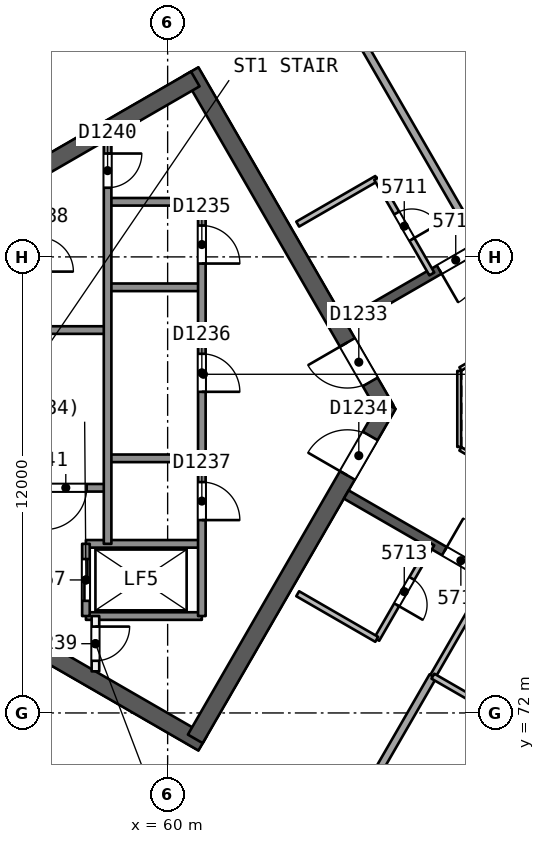
"""IFC4 building model, lengths in metres.
Left out: names, types, materials, properties, quantities, classifications, styles, units other than length and angle.
Written with IfcOpenShell. Run it as: python <this file> out.ifc"""

import sys

from ifc_helpers import new_model, si_unit, direction, frame, frame_2d, origin, place, context, subcontext, project, spatial, rectangle, extrude, element, fill, save


model = new_model("IFC4")
c1 = context("Model", 3, precision=1e-05, world=origin(), true_north=direction((0.0, 1.0)))
c2 = subcontext(c1, "Body", "Model", "MODEL_VIEW")
j1 = project(units=[si_unit("LENGTHUNIT", "METRE"), si_unit("PLANEANGLEUNIT", "RADIAN")], contexts=[c1])
p1 = place(None, origin())
s1 = spatial("IfcSite", under=j1, at=p1, CompositionType="ELEMENT")
p2 = place(p1, origin())
s2 = spatial("IfcBuilding", under=s1, at=p2, CompositionType="ELEMENT")
p3 = place(p2, frame((0.0, 0.0, 231.7)))
s3 = spatial("IfcBuildingStorey", under=s2, at=p3, CompositionType="ELEMENT", Elevation=231.7)
p4 = place(p3, frame((65.74, 80.0, 0.0), z_axis=(0.0, 0.0, 1.0), x_axis=(-0.499991857942, 0.866030104553, 0.0)))
e1 = element("IfcWall", 1, at=p4, inside=s3, PredefinedType="SHEAR", context=c2, shape_type="SweptSolid", body=[
    extrude(rectangle(XDim=10.25, YDim=0.45, at=frame_2d((5.125, 0.0))), origin(), (0.0, 0.0, 1.0), 3.7),
])
p5 = place(p4, frame((0.82, 0.0, 0.0)))
e2 = element("IfcOpeningElement", 2, at=p5, cuts=e1, PredefinedType="OPENING", context=c2, shape_type="SweptSolid", body=[
    extrude(rectangle(XDim=1.2, YDim=2.1, at=frame_2d((0.6, 1.05))), frame((0.0, 0.235, 0.0), z_axis=(0.0, -1.0, 0.0), x_axis=(1.0, 0.0, 0.0)), (0.0, 0.0, 1.0), 0.471),
])
p6 = place(p3, frame((60.728, 88.682, 0.0), z_axis=(0.0, 0.0, 1.0), x_axis=(-0.866021613849, -0.500006564303, 0.0)))
e3 = element("IfcWall", 3, at=p6, inside=s3, PredefinedType="SHEAR", context=c2, shape_type="SweptSolid", body=[
    extrude(rectangle(XDim=14.108, YDim=0.45, at=frame_2d((7.054, 0.0))), origin(), (0.0, 0.0, 1.0), 3.7),
])
p7 = place(p3, frame((48.622, 78.307, 0.0), z_axis=(0.0, 0.0, 1.0), x_axis=(0.86602701116, -0.499997215934, 0.0)))
e4 = element("IfcWall", 4, at=p7, inside=s3, PredefinedType="SHEAR", context=c2, shape_type="SweptSolid", body=[
    extrude(rectangle(XDim=14.204, YDim=0.45, at=frame_2d((7.102, 0.0))), origin(), (0.0, 0.0, 1.0), 3.7),
])
p8 = place(p3, frame((60.728, 71.318, 0.0), z_axis=(0.0, 0.0, 1.0), x_axis=(0.500012416173, 0.866018235185, 0.0)))
e5 = element("IfcWall", 5, at=p8, inside=s3, PredefinedType="SHEAR", context=c2, shape_type="SweptSolid", body=[
    extrude(rectangle(XDim=10.155, YDim=0.45, at=frame_2d((5.078, 0.0))), origin(), (0.0, 0.0, 1.0), 3.7),
])
p9 = place(p8, frame((8.005, 0.0, 0.0)))
e6 = element("IfcOpeningElement", 6, at=p9, cuts=e5, PredefinedType="OPENING", context=c2, shape_type="SweptSolid", body=[
    extrude(rectangle(XDim=1.2, YDim=2.1, at=frame_2d((0.6, 1.05))), frame((0.0, 0.235, 0.0), z_axis=(0.0, -1.0, 0.0), x_axis=(1.0, 0.0, 0.0)), (0.0, 0.0, 1.0), 0.471),
])
p10 = place(p3, frame((78.2, 90.046, 0.0), z_axis=(0.0, 0.0, 1.0), x_axis=(-0.866026492143, -0.499998114903, 0.0)))
e7 = element("IfcWall", 7, at=p10, inside=s3, PredefinedType="SHEAR", context=c2, shape_type="SweptSolid", body=[
    extrude(rectangle(XDim=15.588, YDim=0.25, at=frame_2d((7.794, 0.0))), origin(), (0.0, 0.0, 1.0), 3.3),
])
p11 = place(p10, frame((3.294, 0.0, 0.0)))
e8 = element("IfcOpeningElement", 8, at=p11, cuts=e7, PredefinedType="OPENING", context=c2, shape_type="SweptSolid", body=[
    extrude(rectangle(XDim=1.0, YDim=2.1, at=frame_2d((0.5, 1.05))), frame((0.0, 0.135, 0.0), z_axis=(0.0, -1.0, 0.0), x_axis=(1.0, 0.0, 0.0)), (0.0, 0.0, 1.0), 0.271),
])
p12 = place(p10, frame((9.162, 0.0, 0.0)))
e9 = element("IfcOpeningElement", 9, at=p12, cuts=e7, PredefinedType="OPENING", context=c2, shape_type="SweptSolid", body=[
    extrude(rectangle(XDim=1.1, YDim=2.1, at=frame_2d((0.55, 1.05))), frame((0.0, 0.135, 0.0), z_axis=(0.0, -1.0, 0.0), x_axis=(1.0, 0.0, 0.0)), (0.0, 0.0, 1.0), 0.271),
])
p13 = place(p10, frame((11.762, 0.0, 0.0)))
e10 = element("IfcOpeningElement", 10, at=p13, cuts=e7, PredefinedType="OPENING", context=c2, shape_type="SweptSolid", body=[
    extrude(rectangle(XDim=1.0, YDim=2.1, at=frame_2d((0.5, 1.05))), frame((0.0, 0.135, 0.0), z_axis=(0.0, -1.0, 0.0), x_axis=(1.0, 0.0, 0.0)), (0.0, 0.0, 1.0), 0.271),
])
p14 = place(p3, frame((64.7, 77.748, 0.0), z_axis=(0.0, 0.0, 1.0), x_axis=(0.866026492143, -0.499998114903, 0.0)))
e11 = element("IfcWall", 11, at=p14, inside=s3, PredefinedType="SHEAR", context=c2, shape_type="SweptSolid", body=[
    extrude(rectangle(XDim=15.588, YDim=0.25, at=frame_2d((7.794, 0.0))), origin(), (0.0, 0.0, 1.0), 3.3),
])
p15 = place(p14, frame((2.982, 0.0, 0.0)))
e12 = element("IfcOpeningElement", 12, at=p15, cuts=e11, PredefinedType="OPENING", context=c2, shape_type="SweptSolid", body=[
    extrude(rectangle(XDim=1.0, YDim=2.1, at=frame_2d((0.5, 1.05))), frame((0.0, 0.135, 0.0), z_axis=(0.0, -1.0, 0.0), x_axis=(1.0, 0.0, 0.0)), (0.0, 0.0, 1.0), 0.271),
])
p16 = place(p14, frame((8.538, 0.0, 0.0)))
e13 = element("IfcOpeningElement", 13, at=p16, cuts=e11, PredefinedType="OPENING", context=c2, shape_type="SweptSolid", body=[
    extrude(rectangle(XDim=1.1, YDim=2.1, at=frame_2d((0.55, 1.05))), frame((0.0, 0.135, 0.0), z_axis=(0.0, -1.0, 0.0), x_axis=(1.0, 0.0, 0.0)), (0.0, 0.0, 1.0), 0.271),
])
p17 = place(p14, frame((11.45, 0.0, 0.0)))
e14 = element("IfcOpeningElement", 14, at=p17, cuts=e11, PredefinedType="OPENING", context=c2, shape_type="SweptSolid", body=[
    extrude(rectangle(XDim=1.0, YDim=2.1, at=frame_2d((0.5, 1.05))), frame((0.0, 0.135, 0.0), z_axis=(0.0, -1.0, 0.0), x_axis=(1.0, 0.0, 0.0)), (0.0, 0.0, 1.0), 0.271),
])
p18 = place(p3, frame((63.121, 93.093, 0.0), z_axis=(0.0, 0.0, 1.0), x_axis=(0.499993053251, -0.866029414455, 0.0)))
e15 = element("IfcWall", 15, at=p18, inside=s3, PredefinedType="PARTITIONING", context=c2, shape_type="SweptSolid", body=[
    extrude(rectangle(XDim=10.179, YDim=0.2, at=frame_2d((5.089, 0.0))), origin(), (0.0, 0.0, 1.0), 3.3),
])
p19 = place(p3, frame((63.422, 84.863, 0.0), z_axis=(0.0, 0.0, 1.0), x_axis=(0.865994240961, 0.500053971709, 0.0)))
e16 = element("IfcWall", 16, at=p19, inside=s3, PredefinedType="PARTITIONING", context=c2, shape_type="SweptSolid", body=[
    extrude(rectangle(XDim=2.401, YDim=0.15, at=frame_2d((1.201, 0.0))), origin(), (0.0, 0.0, 1.0), 3.3),
])
p20 = place(p3, frame((65.502, 86.063, 0.0), z_axis=(0.0, 0.0, 1.0), x_axis=(0.499987231761, -0.866032775405, 0.0)))
e17 = element("IfcWall", 17, at=p20, inside=s3, PredefinedType="PARTITIONING", context=c2, shape_type="SweptSolid", body=[
    extrude(rectangle(XDim=2.9, YDim=0.15, at=frame_2d((1.45, 0.0))), origin(), (0.0, 0.0, 1.0), 3.3),
])
p21 = place(p20, frame((1.05, 0.0, 0.0)))
e18 = element("IfcOpeningElement", 18, at=p21, cuts=e17, PredefinedType="OPENING", context=c2, shape_type="SweptSolid", body=[
    extrude(rectangle(XDim=0.8, YDim=2.1, at=frame_2d((0.4, 1.05))), frame((0.0, 0.085, 0.0), z_axis=(0.0, -1.0, 0.0), x_axis=(1.0, 0.0, 0.0)), (0.0, 0.0, 1.0), 0.171),
])
p22 = place(p3, frame((66.952, 76.448, 0.0), z_axis=(0.0, 0.0, 1.0), x_axis=(-0.499987231761, -0.866032775405, 0.0)))
e19 = element("IfcWall", 19, at=p22, inside=s3, PredefinedType="PARTITIONING", context=c2, shape_type="SweptSolid", body=[
    extrude(rectangle(XDim=2.9, YDim=0.15, at=frame_2d((1.45, 0.0))), origin(), (0.0, 0.0, 1.0), 3.3),
])
p23 = place(p22, frame((1.05, 0.0, 0.0)))
e20 = element("IfcOpeningElement", 20, at=p23, cuts=e19, PredefinedType="OPENING", context=c2, shape_type="SweptSolid", body=[
    extrude(rectangle(XDim=0.8, YDim=2.1, at=frame_2d((0.4, 1.05))), frame((0.0, 0.085, 0.0), z_axis=(0.0, -1.0, 0.0), x_axis=(1.0, 0.0, 0.0)), (0.0, 0.0, 1.0), 0.171),
])
p24 = place(p3, frame((65.502, 73.937, 0.0), z_axis=(0.0, 0.0, 1.0), x_axis=(-0.865994240961, 0.500053971709, 0.0)))
e21 = element("IfcWall", 21, at=p24, inside=s3, PredefinedType="PARTITIONING", context=c2, shape_type="SweptSolid", body=[
    extrude(rectangle(XDim=2.401, YDim=0.15, at=frame_2d((1.201, 0.0))), origin(), (0.0, 0.0, 1.0), 3.3),
])
p25 = place(p3, frame((63.391, 66.751, 0.0), z_axis=(0.0, 0.0, 1.0), x_axis=(0.499994271117, 0.866028711331, 0.0)))
e22 = element("IfcWall", 22, at=p25, inside=s3, PredefinedType="PARTITIONING", context=c2, shape_type="SweptSolid", body=[
    extrude(rectangle(XDim=7.179, YDim=0.2, at=frame_2d((3.589, 0.0))), origin(), (0.0, 0.0, 1.0), 3.3),
])
p26 = place(p3, frame((66.98, 72.968, 0.0), z_axis=(0.0, 0.0, 1.0), x_axis=(0.499990139034, 0.866031096941, 0.0)))
e23 = element("IfcWall", 23, at=p26, inside=s3, PredefinedType="PARTITIONING", context=c2, shape_type="SweptSolid", body=[
    extrude(rectangle(XDim=3.0, YDim=0.15, at=frame_2d((1.5, 0.0))), origin(), (0.0, 0.0, 1.0), 3.3),
])
p27 = place(p3, frame((69.491, 71.518, 0.0), z_axis=(0.0, 0.0, 1.0), x_axis=(-0.866032775405, 0.499987231761, 0.0)))
e24 = element("IfcWall", 24, at=p27, inside=s3, PredefinedType="PARTITIONING", context=c2, shape_type="SweptSolid", body=[
    extrude(rectangle(XDim=2.9, YDim=0.15, at=frame_2d((1.45, 0.0))), origin(), (0.0, 0.0, 1.0), 3.3),
])
p28 = place(p3, frame((44.584, 82.563, 0.0), z_axis=(0.0, 0.0, 1.0), x_axis=(0.866023992326, 0.500002444709, 0.0)))
e25 = element("IfcWall", 25, at=p28, inside=s3, PredefinedType="SOLIDWALL", context=c2, shape_type="SweptSolid", body=[
    extrude(rectangle(XDim=50.118, YDim=0.3, at=frame_2d((25.059, 0.0))), origin(), (0.0, 0.0, 1.0), 3.3),
])
p29 = place(p28, frame((23.391, 0.0, 0.0)))
e26 = element("IfcOpeningElement", 26, at=p29, cuts=e25, PredefinedType="OPENING", context=c2, shape_type="SweptSolid", body=[
    extrude(rectangle(XDim=2.4, YDim=2.4, at=frame_2d((1.2, 1.2))), frame((0.0, 0.161, 0.0), z_axis=(0.0, -1.0, 0.0), x_axis=(1.0, 0.0, 0.0)), (0.0, 0.0, 1.0), 0.321),
])
p30 = place(p28, frame((37.835, 0.0, 0.0)))
e27 = element("IfcOpeningElement", 27, at=p30, cuts=e25, PredefinedType="OPENING", context=c2, shape_type="SweptSolid", body=[
    extrude(rectangle(XDim=2.4, YDim=2.4, at=frame_2d((1.2, 1.2))), frame((0.0, 0.161, 0.0), z_axis=(0.0, -1.0, 0.0), x_axis=(1.0, 0.0, 0.0)), (0.0, 0.0, 1.0), 0.321),
])
p31 = place(p28, frame((9.416, 0.0, 0.0)))
e28 = element("IfcOpeningElement", 28, at=p31, cuts=e25, PredefinedType="OPENING", context=c2, shape_type="SweptSolid", body=[
    extrude(rectangle(XDim=2.4, YDim=2.4, at=frame_2d((1.2, 1.2))), frame((0.0, 0.161, 0.0), z_axis=(0.0, -1.0, 0.0), x_axis=(1.0, 0.0, 0.0)), (0.0, 0.0, 1.0), 0.321),
])
p32 = place(p3, frame((87.988, 52.377, 0.0), z_axis=(0.0, 0.0, 1.0), x_axis=(-0.866023992326, 0.500002444709, 0.0)))
e29 = element("IfcWall", 29, at=p32, inside=s3, PredefinedType="SOLIDWALL", context=c2, shape_type="SweptSolid", body=[
    extrude(rectangle(XDim=50.118, YDim=0.3, at=frame_2d((25.059, 0.0))), origin(), (0.0, 0.0, 1.0), 3.3),
])
p33 = place(p32, frame((24.015, 0.0, 0.0)))
e30 = element("IfcOpeningElement", 30, at=p33, cuts=e29, PredefinedType="OPENING", context=c2, shape_type="SweptSolid", body=[
    extrude(rectangle(XDim=2.4, YDim=2.4, at=frame_2d((1.2, 1.2))), frame((0.0, 0.161, 0.0), z_axis=(0.0, -1.0, 0.0), x_axis=(1.0, 0.0, 0.0)), (0.0, 0.0, 1.0), 0.321),
])
p34 = place(p32, frame((38.146, 0.0, 0.0)))
e31 = element("IfcOpeningElement", 31, at=p34, cuts=e29, PredefinedType="OPENING", context=c2, shape_type="SweptSolid", body=[
    extrude(rectangle(XDim=2.4, YDim=2.4, at=frame_2d((1.2, 1.2))), frame((0.0, 0.161, 0.0), z_axis=(0.0, -1.0, 0.0), x_axis=(1.0, 0.0, 0.0)), (0.0, 0.0, 1.0), 0.321),
])
p35 = place(p32, frame((9.727, 0.0, 0.0)))
e32 = element("IfcOpeningElement", 32, at=p35, cuts=e29, PredefinedType="OPENING", context=c2, shape_type="SweptSolid", body=[
    extrude(rectangle(XDim=2.4, YDim=2.4, at=frame_2d((1.2, 1.2))), frame((0.0, 0.161, 0.0), z_axis=(0.0, -1.0, 0.0), x_axis=(1.0, 0.0, 0.0)), (0.0, 0.0, 1.0), 0.321),
])
for number, where, z_axis, x_axis in (
    (33, (60.9, 85.45, 0.0), (0.0, 0.0, 1.0), (-1.0, 0.0, 0.0)),
    (34, (60.9, 83.2, 0.0), (0.0, 0.0, 1.0), (-1.0, 0.0, 0.0)),
):
    element("IfcWall", number, at=place(p3, frame(where, z_axis=z_axis, x_axis=x_axis)), inside=s3, PredefinedType="SOLIDWALL", context=c2, shape_type="SweptSolid", body=[
        extrude(rectangle(XDim=2.48, YDim=0.2, at=frame_2d((1.24, 0.0))), origin(), (0.0, 0.0, 1.0), 3.3),
    ])
p36 = place(p3, frame((58.42, 82.075, 0.0), z_axis=(0.0, 0.0, 1.0), x_axis=(-1.0, 0.0, 0.0)))
e35 = element("IfcWall", 35, at=p36, inside=s3, PredefinedType="SOLIDWALL", context=c2, shape_type="SweptSolid", body=[
    extrude(rectangle(XDim=7.7, YDim=0.2, at=frame_2d((3.85, 0.0))), origin(), (0.0, 0.0, 1.0), 3.3),
])
p37 = place(p3, frame((60.9, 78.7, 0.0), z_axis=(0.0, 0.0, 1.0), x_axis=(-1.0, 0.0, 0.0)))
e36 = element("IfcWall", 36, at=p37, inside=s3, PredefinedType="SOLIDWALL", context=c2, shape_type="SweptSolid", body=[
    extrude(rectangle(XDim=2.48, YDim=0.2, at=frame_2d((1.24, 0.0))), origin(), (0.0, 0.0, 1.0), 3.3),
])
p38 = place(p3, frame((58.42, 77.925, 0.0), z_axis=(0.0, 0.0, 1.0), x_axis=(-1.0, 0.0, 0.0)))
e37 = element("IfcWall", 37, at=p38, inside=s3, PredefinedType="SOLIDWALL", context=c2, shape_type="SweptSolid", body=[
    extrude(rectangle(XDim=7.7, YDim=0.2, at=frame_2d((3.85, 0.0))), origin(), (0.0, 0.0, 1.0), 3.3),
])
p39 = place(p38, frame((0.55, 0.0, 0.0)))
e38 = element("IfcOpeningElement", 38, at=p39, cuts=e37, PredefinedType="OPENING", context=c2, shape_type="SweptSolid", body=[
    extrude(rectangle(XDim=1.1, YDim=2.1, at=frame_2d((0.55, 1.05))), frame((0.0, 0.11, 0.0), z_axis=(0.0, -1.0, 0.0), x_axis=(1.0, 0.0, 0.0)), (0.0, 0.0, 1.0), 0.221),
])
for number, where, z_axis, x_axis in (
    (39, (60.9, 76.45, 0.0), (0.0, 0.0, 1.0), (-1.0, 0.0, 0.0)),
    (40, (60.9, 74.55, 0.0), (0.0, 0.0, 1.0), (-1.0, 0.0, 0.0)),
):
    element("IfcWall", number, at=place(p3, frame(where, z_axis=z_axis, x_axis=x_axis)), inside=s3, PredefinedType="SOLIDWALL", context=c2, shape_type="SweptSolid", body=[
        extrude(rectangle(XDim=3.05, YDim=0.2, at=frame_2d((1.525, 0.0))), origin(), (0.0, 0.0, 1.0), 3.3),
    ])
p40 = place(p3, frame((60.9, 85.45, 0.0), z_axis=(0.0, 0.0, 1.0), x_axis=(0.0, -1.0, 0.0)))
e41 = element("IfcWall", 41, at=p40, inside=s3, PredefinedType="SOLIDWALL", context=c2, shape_type="SweptSolid", body=[
    extrude(rectangle(XDim=10.9, YDim=0.2, at=frame_2d((5.45, 0.0))), origin(), (0.0, 0.0, 1.0), 3.3),
])
p41 = place(p40, frame((0.625, 0.0, 0.0)))
e42 = element("IfcOpeningElement", 42, at=p41, cuts=e41, PredefinedType="OPENING", context=c2, shape_type="SweptSolid", body=[
    extrude(rectangle(XDim=1.0, YDim=2.1, at=frame_2d((0.5, 1.05))), frame((0.0, 0.11, 0.0), z_axis=(0.0, -1.0, 0.0), x_axis=(1.0, 0.0, 0.0)), (0.0, 0.0, 1.0), 0.221),
])
p42 = place(p40, frame((4.0, 0.0, 0.0)))
e43 = element("IfcOpeningElement", 43, at=p42, cuts=e41, PredefinedType="OPENING", context=c2, shape_type="SweptSolid", body=[
    extrude(rectangle(XDim=1.0, YDim=2.1, at=frame_2d((0.5, 1.05))), frame((0.0, 0.11, 0.0), z_axis=(0.0, -1.0, 0.0), x_axis=(1.0, 0.0, 0.0)), (0.0, 0.0, 1.0), 0.221),
])
p43 = place(p40, frame((7.375, 0.0, 0.0)))
e44 = element("IfcOpeningElement", 44, at=p43, cuts=e41, PredefinedType="OPENING", context=c2, shape_type="SweptSolid", body=[
    extrude(rectangle(XDim=1.0, YDim=2.1, at=frame_2d((0.5, 1.05))), frame((0.0, 0.11, 0.0), z_axis=(0.0, -1.0, 0.0), x_axis=(1.0, 0.0, 0.0)), (0.0, 0.0, 1.0), 0.221),
])
p44 = place(p3, frame((58.42, 87.09, 0.0), z_axis=(0.0, 0.0, 1.0), x_axis=(0.0, -1.0, 0.0)))
e45 = element("IfcWall", 45, at=p44, inside=s3, PredefinedType="SOLIDWALL", context=c2, shape_type="SweptSolid", body=[
    extrude(rectangle(XDim=10.64, YDim=0.2, at=frame_2d((5.32, 0.0))), origin(), (0.0, 0.0, 1.0), 3.3),
])
p45 = place(p44, frame((0.37, 0.0, 0.0)))
e46 = element("IfcOpeningElement", 46, at=p45, cuts=e45, PredefinedType="OPENING", context=c2, shape_type="SweptSolid", body=[
    extrude(rectangle(XDim=0.9, YDim=2.1, at=frame_2d((0.45, 1.05))), frame((0.0, 0.11, 0.0), z_axis=(0.0, -1.0, 0.0), x_axis=(1.0, 0.0, 0.0)), (0.0, 0.0, 1.0), 0.221),
])
p46 = place(p3, frame((58.1, 74.55, 0.0), z_axis=(0.0, 0.0, 1.0), x_axis=(0.0, -1.0, 0.0)))
e47 = element("IfcWall", 47, at=p46, inside=s3, PredefinedType="PARTITIONING", context=c2, shape_type="SweptSolid", body=[
    extrude(rectangle(XDim=1.455, YDim=0.2, at=frame_2d((0.728, 0.0))), origin(), (0.0, 0.0, 1.0), 3.3),
])
p47 = place(p46, frame((0.278, 0.0, 0.0)))
e48 = element("IfcOpeningElement", 48, at=p47, cuts=e47, PredefinedType="OPENING", context=c2, shape_type="SweptSolid", body=[
    extrude(rectangle(XDim=0.9, YDim=2.1, at=frame_2d((0.45, 1.05))), frame((0.0, 0.11, 0.0), z_axis=(0.0, -1.0, 0.0), x_axis=(1.0, 0.0, 0.0)), (0.0, 0.0, 1.0), 0.221),
])
p48 = place(p3, frame((57.85, 76.45, 0.0), z_axis=(0.0, 0.0, 1.0), x_axis=(0.0, -1.0, 0.0)))
e49 = element("IfcWall", 49, at=p48, inside=s3, PredefinedType="SOLIDWALL", context=c2, shape_type="SweptSolid", body=[
    extrude(rectangle(XDim=1.9, YDim=0.2, at=frame_2d((0.95, 0.0))), origin(), (0.0, 0.0, 1.0), 3.3),
])
p49 = place(p48, frame((0.4, 0.0, 0.0)))
e50 = element("IfcOpeningElement", 50, at=p49, cuts=e49, PredefinedType="OPENING", context=c2, shape_type="SweptSolid", body=[
    extrude(rectangle(XDim=1.1, YDim=2.1, at=frame_2d((0.55, 1.05))), frame((0.0, 0.11, 0.0), z_axis=(0.0, -1.0, 0.0), x_axis=(1.0, 0.0, 0.0)), (0.0, 0.0, 1.0), 0.221),
])
p50 = place(p3, frame((77.738, 86.846, 0.0), z_axis=(0.0, 0.0, 1.0), x_axis=(-0.866026658274, -0.499997827154, 0.0)))
e51 = element("IfcWall", 51, at=p50, inside=s3, PredefinedType="PARTITIONING", context=c2, shape_type="SweptSolid", body=[
    extrude(rectangle(XDim=11.588, YDim=0.1, at=frame_2d((5.794, 0.0))), origin(), (0.0, 0.0, 1.0), 3.3),
])
p51 = place(p3, frame((67.672, 81.0, 0.0), z_axis=(0.0, 0.0, 1.0), x_axis=(0.0, -1.0, 0.0)))
e52 = element("IfcWall", 52, at=p51, inside=s3, PredefinedType="PARTITIONING", context=c2, shape_type="SweptSolid", body=[
    extrude(rectangle(XDim=2.0, YDim=0.1, at=frame_2d((1.0, 0.0))), origin(), (0.0, 0.0, 1.0), 3.3),
])
p52 = place(p3, frame((67.702, 78.948, 0.0), z_axis=(0.0, 0.0, 1.0), x_axis=(0.866026658274, -0.499997827154, 0.0)))
e53 = element("IfcWall", 53, at=p52, inside=s3, PredefinedType="PARTITIONING", context=c2, shape_type="SweptSolid", body=[
    extrude(rectangle(XDim=11.588, YDim=0.1, at=frame_2d((5.794, 0.0))), origin(), (0.0, 0.0, 1.0), 3.3),
])
p53 = place(p21, origin())
e54 = element("IfcDoor", 54, at=p53, inside=s3, OperationType="SINGLE_SWING_RIGHT", PredefinedType="NOTDEFINED", context=c2, shape_type="SweptSolid", body=[
    extrude(rectangle(XDim=0.8, YDim=2.1, at=frame_2d((0.4, 1.05))), frame((0.0, 0.025, 0.0), z_axis=(0.0, -1.0, 0.0), x_axis=(1.0, 0.0, 0.0)), (0.0, 0.0, 1.0), 0.05),
])
fill(e18, e54)
p54 = place(p13, origin())
e55 = element("IfcDoor", 55, at=p54, inside=s3, OperationType="SINGLE_SWING_RIGHT", PredefinedType="NOTDEFINED", context=c2, shape_type="SweptSolid", body=[
    extrude(rectangle(XDim=1.0, YDim=2.1, at=frame_2d((0.5, 1.05))), frame((0.0, 0.025, 0.0), z_axis=(0.0, -1.0, 0.0), x_axis=(1.0, 0.0, 0.0)), (0.0, 0.0, 1.0), 0.05),
])
fill(e10, e55)
p55 = place(p23, origin())
e56 = element("IfcDoor", 56, at=p55, inside=s3, OperationType="SINGLE_SWING_RIGHT", PredefinedType="NOTDEFINED", context=c2, shape_type="SweptSolid", body=[
    extrude(rectangle(XDim=0.8, YDim=2.1, at=frame_2d((0.4, 1.05))), frame((0.0, 0.025, 0.0), z_axis=(0.0, -1.0, 0.0), x_axis=(1.0, 0.0, 0.0)), (0.0, 0.0, 1.0), 0.05),
])
fill(e20, e56)
p56 = place(p15, origin())
e57 = element("IfcDoor", 57, at=p56, inside=s3, OperationType="SINGLE_SWING_LEFT", PredefinedType="NOTDEFINED", context=c2, shape_type="SweptSolid", body=[
    extrude(rectangle(XDim=1.0, YDim=2.1, at=frame_2d((0.5, 1.05))), frame((0.0, 0.025, 0.0), z_axis=(0.0, -1.0, 0.0), x_axis=(1.0, 0.0, 0.0)), (0.0, 0.0, 1.0), 0.05),
])
fill(e12, e57)
p57 = place(p5, origin())
e58 = element("IfcDoor", 58, at=p57, inside=s3, OperationType="SINGLE_SWING_RIGHT", PredefinedType="NOTDEFINED", context=c2, shape_type="SweptSolid", body=[
    extrude(rectangle(XDim=1.2, YDim=2.1, at=frame_2d((0.6, 1.05))), frame((0.0, 0.025, 0.0), z_axis=(0.0, -1.0, 0.0), x_axis=(1.0, 0.0, 0.0)), (0.0, 0.0, 1.0), 0.05),
])
fill(e2, e58)
p58 = place(p9, origin())
e59 = element("IfcDoor", 59, at=p58, inside=s3, OperationType="SINGLE_SWING_LEFT", PredefinedType="NOTDEFINED", context=c2, shape_type="SweptSolid", body=[
    extrude(rectangle(XDim=1.2, YDim=2.1, at=frame_2d((0.6, 1.05))), frame((0.0, 0.025, 0.0), z_axis=(0.0, -1.0, 0.0), x_axis=(1.0, 0.0, 0.0)), (0.0, 0.0, 1.0), 0.05),
])
fill(e6, e59)
p59 = place(p49, origin())
e60 = element("IfcDoor", 60, at=p59, inside=s3, OperationType="SLIDING_TO_RIGHT", PredefinedType="NOTDEFINED", context=c2, shape_type="SweptSolid", body=[
    extrude(rectangle(XDim=1.1, YDim=2.1, at=frame_2d((0.55, 1.05))), frame((0.0, 0.025, 0.0), z_axis=(0.0, -1.0, 0.0), x_axis=(1.0, 0.0, 0.0)), (0.0, 0.0, 1.0), 0.05),
])
fill(e50, e60)
p60 = place(p41, origin())
e61 = element("IfcDoor", 61, at=p60, inside=s3, OperationType="SINGLE_SWING_RIGHT", PredefinedType="NOTDEFINED", context=c2, shape_type="SweptSolid", body=[
    extrude(rectangle(XDim=1.0, YDim=2.1, at=frame_2d((0.5, 1.05))), frame((0.0, 0.025, 0.0), z_axis=(0.0, -1.0, 0.0), x_axis=(1.0, 0.0, 0.0)), (0.0, 0.0, 1.0), 0.05),
])
fill(e42, e61)
p61 = place(p42, origin())
e62 = element("IfcDoor", 62, at=p61, inside=s3, OperationType="SINGLE_SWING_RIGHT", PredefinedType="NOTDEFINED", context=c2, shape_type="SweptSolid", body=[
    extrude(rectangle(XDim=1.0, YDim=2.1, at=frame_2d((0.5, 1.05))), frame((0.0, 0.025, 0.0), z_axis=(0.0, -1.0, 0.0), x_axis=(1.0, 0.0, 0.0)), (0.0, 0.0, 1.0), 0.05),
])
fill(e43, e62)
p62 = place(p43, origin())
e63 = element("IfcDoor", 63, at=p62, inside=s3, OperationType="SINGLE_SWING_RIGHT", PredefinedType="NOTDEFINED", context=c2, shape_type="SweptSolid", body=[
    extrude(rectangle(XDim=1.0, YDim=2.1, at=frame_2d((0.5, 1.05))), frame((0.0, 0.025, 0.0), z_axis=(0.0, -1.0, 0.0), x_axis=(1.0, 0.0, 0.0)), (0.0, 0.0, 1.0), 0.05),
])
fill(e44, e63)
p63 = place(p47, origin())
e64 = element("IfcDoor", 64, at=p63, inside=s3, OperationType="SINGLE_SWING_LEFT", PredefinedType="NOTDEFINED", context=c2, shape_type="SweptSolid", body=[
    extrude(rectangle(XDim=0.9, YDim=2.1, at=frame_2d((0.45, 1.05))), frame((0.0, 0.025, 0.0), z_axis=(0.0, -1.0, 0.0), x_axis=(1.0, 0.0, 0.0)), (0.0, 0.0, 1.0), 0.05),
])
fill(e48, e64)
p64 = place(p45, origin())
e65 = element("IfcDoor", 65, at=p64, inside=s3, OperationType="SINGLE_SWING_LEFT", PredefinedType="NOTDEFINED", context=c2, shape_type="SweptSolid", body=[
    extrude(rectangle(XDim=0.9, YDim=2.1, at=frame_2d((0.45, 1.05))), frame((0.0, 0.025, 0.0), z_axis=(0.0, -1.0, 0.0), x_axis=(1.0, 0.0, 0.0)), (0.0, 0.0, 1.0), 0.05),
])
fill(e46, e65)
p65 = place(p39, origin())
e66 = element("IfcDoor", 66, at=p65, inside=s3, OperationType="SINGLE_SWING_RIGHT", PredefinedType="NOTDEFINED", context=c2, shape_type="SweptSolid", body=[
    extrude(rectangle(XDim=1.1, YDim=2.1, at=frame_2d((0.55, 1.05))), frame((0.0, 0.025, 0.0), z_axis=(0.0, -1.0, 0.0), x_axis=(1.0, 0.0, 0.0)), (0.0, 0.0, 1.0), 0.05),
])
fill(e38, e66)
save(model, sys.argv[1])
